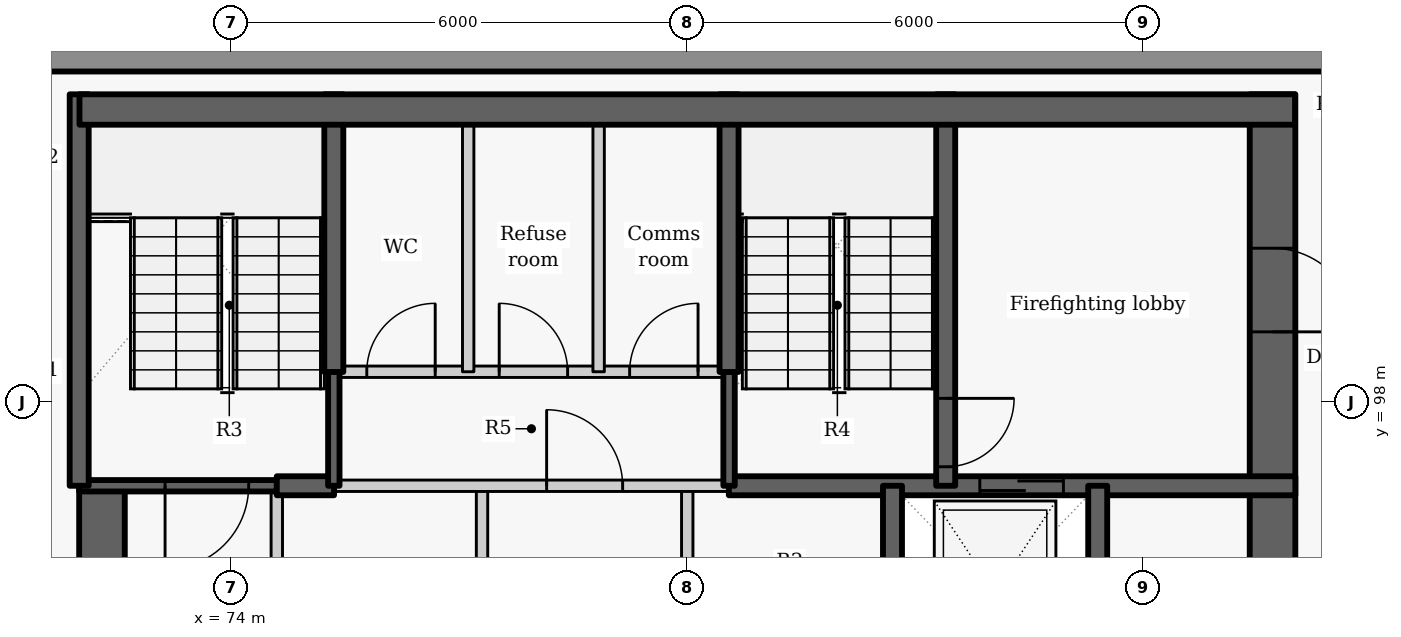
"""IFC4 building model, lengths in metres.
Left out: names, types, materials, properties, quantities, classifications, styles, units other than length and angle.
Written with IfcOpenShell. Run it as: python <this file> out.ifc"""

import sys

from ifc_helpers import new_model, si_unit, direction, frame, frame_2d, origin, place, context, subcontext, project, spatial, rectangle, extrude, element, fill, save


model = new_model("IFC4")
c1 = context("Model", 3, precision=1e-05, world=origin(), true_north=direction((0.0, 1.0)))
c2 = subcontext(c1, "Body", "Model", "MODEL_VIEW")
j1 = project(units=[si_unit("LENGTHUNIT", "METRE"), si_unit("PLANEANGLEUNIT", "RADIAN")], contexts=[c1])
p1 = place(None, origin())
s1 = spatial("IfcSite", under=j1, at=p1, CompositionType="ELEMENT")
p2 = place(p1, origin())
s2 = spatial("IfcBuilding", under=s1, at=p2, CompositionType="ELEMENT")
p3 = place(p2, frame((0.0, 0.0, 279.6)))
s3 = spatial("IfcBuildingStorey", under=s2, at=p3, CompositionType="ELEMENT", Elevation=279.6)
p4 = place(p3, frame((89.549, 102.5, 0.0), z_axis=(0.0, 0.0, 1.0), x_axis=(-1.0, 0.0, 0.0)))
e1 = element("IfcWall", 1, at=p4, inside=s3, PredefinedType="SOLIDWALL", context=c2, shape_type="SweptSolid", body=[
    extrude(rectangle(XDim=19.134, YDim=0.3, at=frame_2d((9.567, 0.0))), origin(), (0.0, 0.0, 1.0), 2.725),
])
p5 = place(p3, frame((74.6, 94.1, 0.0), z_axis=(0.0, 0.0, 1.0), x_axis=(0.0, 1.0, 0.0)))
e2 = element("IfcWall", 2, at=p5, inside=s3, PredefinedType="PARTITIONING", context=c2, shape_type="SweptSolid", body=[
    extrude(rectangle(XDim=2.8, YDim=0.15, at=frame_2d((1.4, 0.0))), origin(), (0.0, 0.0, 1.0), 3.325),
])
p6 = place(p3, frame((72.3, 87.8, -0.275), z_axis=(0.0, 0.0, 1.0), x_axis=(0.0, 1.0, 0.0)))
e3 = element("IfcWall", 3, at=p6, inside=s3, PredefinedType="SHEAR", context=c2, shape_type="SweptSolid", body=[
    extrude(rectangle(XDim=9.1, YDim=0.6, at=frame_2d((4.55, 0.0))), origin(), (0.0, 0.0, 1.0), 3.6),
])
p7 = place(p6, frame((3.85, 0.0, 0.275)))
e4 = element("IfcOpeningElement", 4, at=p7, cuts=e3, PredefinedType="OPENING", context=c2, shape_type="SweptSolid", body=[
    extrude(rectangle(XDim=1.5, YDim=2.1, at=frame_2d((0.75, 1.05))), frame((0.0, 0.31, 0.0), z_axis=(0.0, -1.0, 0.0), x_axis=(1.0, 0.0, 0.0)), (0.0, 0.0, 1.0), 0.62),
])
p8 = place(p3, frame((80.0, 94.1, 0.0), z_axis=(0.0, 0.0, 1.0), x_axis=(0.0, 1.0, 0.0)))
e5 = element("IfcWall", 5, at=p8, inside=s3, PredefinedType="PARTITIONING", context=c2, shape_type="SweptSolid", body=[
    extrude(rectangle(XDim=2.8, YDim=0.15, at=frame_2d((1.4, 0.0))), origin(), (0.0, 0.0, 1.0), 3.325),
])
p9 = place(p3, frame((87.7, 102.05, -0.275), z_axis=(0.0, 0.0, 1.0), x_axis=(0.0, -1.0, 0.0)))
e6 = element("IfcWall", 6, at=p9, inside=s3, PredefinedType="SHEAR", context=c2, shape_type="SweptSolid", body=[
    extrude(rectangle(XDim=11.35, YDim=0.6, at=frame_2d((5.675, 0.0))), origin(), (0.0, 0.0, 1.0), 3.6),
])
p10 = place(p9, frame((8.9, 0.0, 0.275)))
e7 = element("IfcOpeningElement", 7, at=p10, cuts=e6, PredefinedType="OPENING", context=c2, shape_type="SweptSolid", body=[
    extrude(rectangle(XDim=1.5, YDim=2.1, at=frame_2d((0.75, 1.05))), frame((0.0, 0.31, 0.0), z_axis=(0.0, -1.0, 0.0), x_axis=(1.0, 0.0, 0.0)), (0.0, 0.0, 1.0), 0.62),
])
p11 = place(p9, frame((2.025, 0.0, 0.275)))
e8 = element("IfcOpeningElement", 8, at=p11, cuts=e6, PredefinedType="OPENING", context=c2, shape_type="SweptSolid", body=[
    extrude(rectangle(XDim=1.1, YDim=2.1, at=frame_2d((0.55, 1.05))), frame((0.0, 0.31, 0.0), z_axis=(0.0, -1.0, 0.0), x_axis=(1.0, 0.0, 0.0)), (0.0, 0.0, 1.0), 0.62),
])
p12 = place(p3, frame((74.6, 96.9, -0.275), z_axis=(0.0, 0.0, 1.0), x_axis=(-1.0, 0.0, 0.0)))
e9 = element("IfcWall", 9, at=p12, inside=s3, PredefinedType="SHEAR", context=c2, shape_type="SweptSolid", body=[
    extrude(rectangle(XDim=2.6, YDim=0.15, at=frame_2d((1.3, 0.0))), origin(), (0.0, 0.0, 1.0), 3.6),
])
p13 = place(p12, frame((0.37, 0.0, 0.275)))
e10 = element("IfcOpeningElement", 10, at=p13, cuts=e9, PredefinedType="OPENING", context=c2, shape_type="SweptSolid", body=[
    extrude(rectangle(XDim=1.1, YDim=2.1, at=frame_2d((0.55, 1.05))), frame((0.0, 0.085, 0.0), z_axis=(0.0, -1.0, 0.0), x_axis=(1.0, 0.0, 0.0)), (0.0, 0.0, 1.0), 0.17),
])
p14 = place(p3, frame((77.3, 94.1, 0.0), z_axis=(0.0, 0.0, 1.0), x_axis=(0.0, 1.0, 0.0)))
e11 = element("IfcWall", 11, at=p14, inside=s3, PredefinedType="PARTITIONING", context=c2, shape_type="SweptSolid", body=[
    extrude(rectangle(XDim=2.8, YDim=0.15, at=frame_2d((1.4, 0.0))), origin(), (0.0, 0.0, 1.0), 3.325),
])
p15 = place(p3, frame((74.6, 96.9, -0.275), z_axis=(0.0, 0.0, 1.0), x_axis=(1.0, 0.0, 0.0)))
e12 = element("IfcWall", 12, at=p15, inside=s3, PredefinedType="SHEAR", context=c2, shape_type="SweptSolid", body=[
    extrude(rectangle(XDim=0.753, YDim=0.25, at=frame_2d((0.376, 0.0))), origin(), (0.0, 0.0, 1.0), 3.6),
])
p16 = place(p3, frame((80.547, 96.9, -0.275), z_axis=(0.0, 0.0, 1.0), x_axis=(1.0, 0.0, 0.0)))
e13 = element("IfcWall", 13, at=p16, inside=s3, PredefinedType="SHEAR", context=c2, shape_type="SweptSolid", body=[
    extrude(rectangle(XDim=7.453, YDim=0.25, at=frame_2d((3.727, 0.0))), origin(), (0.0, 0.0, 1.0), 3.6),
])
p17 = place(p16, frame((3.302, 0.0, 0.275)))
e14 = element("IfcOpeningElement", 14, at=p17, cuts=e13, PredefinedType="OPENING", context=c2, shape_type="SweptSolid", body=[
    extrude(rectangle(XDim=1.1, YDim=2.1, at=frame_2d((0.55, 1.05))), frame((0.0, 0.135, 0.0), z_axis=(0.0, -1.0, 0.0), x_axis=(1.0, 0.0, 0.0)), (0.0, 0.0, 1.0), 0.27),
])
p18 = place(p3, frame((75.347, 96.9, 0.0), z_axis=(0.0, 0.0, 1.0), x_axis=(1.0, 0.0, 0.0)))
e15 = element("IfcWall", 15, at=p18, inside=s3, PredefinedType="PARTITIONING", context=c2, shape_type="SweptSolid", body=[
    extrude(rectangle(XDim=5.206, YDim=0.15, at=frame_2d((2.603, 0.0))), origin(), (0.0, 0.0, 1.0), 3.325),
])
p19 = place(p18, frame((2.803, 0.0, 0.0)))
e16 = element("IfcOpeningElement", 16, at=p19, cuts=e15, PredefinedType="OPENING", context=c2, shape_type="SweptSolid", body=[
    extrude(rectangle(XDim=1.0, YDim=2.1, at=frame_2d((0.5, 1.05))), frame((0.0, 0.085, 0.0), z_axis=(0.0, -1.0, 0.0), x_axis=(1.0, 0.0, 0.0)), (0.0, 0.0, 1.0), 0.17),
])
for number, where, z_axis, x_axis in (
    (17, (82.7, 94.1, -0.275), (0.0, 0.0, 1.0), (0.0, 1.0, 0.0)),
    (18, (85.4, 94.1, -0.275), (0.0, 0.0, 1.0), (0.0, 1.0, 0.0)),
):
    element("IfcWall", number, at=place(p3, frame(where, z_axis=z_axis, x_axis=x_axis)), inside=s3, PredefinedType="SHEAR", context=c2, shape_type="SweptSolid", body=[
        extrude(rectangle(XDim=2.8, YDim=0.25, at=frame_2d((1.4, 0.0))), origin(), (0.0, 0.0, 1.0), 3.6),
    ])
p20 = place(p3, frame((75.35, 96.9, -0.275), z_axis=(0.0, 0.0, 1.0), x_axis=(0.0, 1.0, 0.0)))
e19 = element("IfcWall", 19, at=p20, inside=s3, PredefinedType="SHEAR", context=c2, shape_type="SweptSolid", body=[
    extrude(rectangle(XDim=1.503, YDim=0.15, at=frame_2d((0.751, 0.0))), origin(), (0.0, 0.0, 1.0), 3.6),
])
p21 = place(p3, frame((75.35, 98.397, -0.275), z_axis=(0.0, 0.0, 1.0), x_axis=(0.0, 1.0, 0.0)))
e20 = element("IfcWall", 20, at=p21, inside=s3, PredefinedType="SHEAR", context=c2, shape_type="SweptSolid", body=[
    extrude(rectangle(XDim=3.653, YDim=0.25, at=frame_2d((1.827, 0.0))), origin(), (0.0, 0.0, 1.0), 3.6),
])
p22 = place(p3, frame((72.0, 96.9, -0.275), z_axis=(0.0, 0.0, 1.0), x_axis=(0.0, 1.0, 0.0)))
e21 = element("IfcWall", 21, at=p22, inside=s3, PredefinedType="SHEAR", context=c2, shape_type="SweptSolid", body=[
    extrude(rectangle(XDim=5.15, YDim=0.25, at=frame_2d((2.575, 0.0))), origin(), (0.0, 0.0, 1.0), 3.6),
])
p23 = place(p3, frame((83.4, 102.05, -0.275), z_axis=(0.0, 0.0, 1.0), x_axis=(0.0, -1.0, 0.0)))
e22 = element("IfcWall", 22, at=p23, inside=s3, PredefinedType="SHEAR", context=c2, shape_type="SweptSolid", body=[
    extrude(rectangle(XDim=5.15, YDim=0.25, at=frame_2d((2.575, 0.0))), origin(), (0.0, 0.0, 1.0), 3.6),
])
p24 = place(p23, frame((4.0, 0.0, 0.275)))
e23 = element("IfcOpeningElement", 23, at=p24, cuts=e22, PredefinedType="OPENING", context=c2, shape_type="SweptSolid", body=[
    extrude(rectangle(XDim=0.9, YDim=2.1, at=frame_2d((0.45, 1.05))), frame((0.0, 0.135, 0.0), z_axis=(0.0, -1.0, 0.0), x_axis=(1.0, 0.0, 0.0)), (0.0, 0.0, 1.0), 0.27),
])
p25 = place(p3, frame((80.55, 96.9, -0.275), z_axis=(0.0, 0.0, 1.0), x_axis=(0.0, 1.0, 0.0)))
e24 = element("IfcWall", 24, at=p25, inside=s3, PredefinedType="SHEAR", context=c2, shape_type="SweptSolid", body=[
    extrude(rectangle(XDim=1.503, YDim=0.15, at=frame_2d((0.751, 0.0))), origin(), (0.0, 0.0, 1.0), 3.6),
])
p26 = place(p3, frame((80.55, 98.397, -0.275), z_axis=(0.0, 0.0, 1.0), x_axis=(0.0, 1.0, 0.0)))
e25 = element("IfcWall", 25, at=p26, inside=s3, PredefinedType="SHEAR", context=c2, shape_type="SweptSolid", body=[
    extrude(rectangle(XDim=3.653, YDim=0.25, at=frame_2d((1.827, 0.0))), origin(), (0.0, 0.0, 1.0), 3.6),
])
p27 = place(p3, frame((75.35, 98.4, 0.0), z_axis=(0.0, 0.0, 1.0), x_axis=(1.0, 0.0, 0.0)))
e26 = element("IfcWall", 26, at=p27, inside=s3, PredefinedType="PARTITIONING", context=c2, shape_type="SweptSolid", body=[
    extrude(rectangle(XDim=5.2, YDim=0.15, at=frame_2d((2.6, 0.0))), origin(), (0.0, 0.0, 1.0), 3.325),
])
p28 = place(p27, frame((0.434, 0.0, 0.0)))
e27 = element("IfcOpeningElement", 27, at=p28, cuts=e26, PredefinedType="OPENING", context=c2, shape_type="SweptSolid", body=[
    extrude(rectangle(XDim=0.9, YDim=2.1, at=frame_2d((0.45, 1.05))), frame((0.0, 0.085, 0.0), z_axis=(0.0, -1.0, 0.0), x_axis=(1.0, 0.0, 0.0)), (0.0, 0.0, 1.0), 0.17),
])
p29 = place(p27, frame((2.176, 0.0, 0.0)))
e28 = element("IfcOpeningElement", 28, at=p29, cuts=e26, PredefinedType="OPENING", context=c2, shape_type="SweptSolid", body=[
    extrude(rectangle(XDim=0.9, YDim=2.1, at=frame_2d((0.45, 1.05))), frame((0.0, 0.085, 0.0), z_axis=(0.0, -1.0, 0.0), x_axis=(1.0, 0.0, 0.0)), (0.0, 0.0, 1.0), 0.17),
])
p30 = place(p27, frame((3.892, 0.0, 0.0)))
e29 = element("IfcOpeningElement", 29, at=p30, cuts=e26, PredefinedType="OPENING", context=c2, shape_type="SweptSolid", body=[
    extrude(rectangle(XDim=0.9, YDim=2.1, at=frame_2d((0.45, 1.05))), frame((0.0, 0.085, 0.0), z_axis=(0.0, -1.0, 0.0), x_axis=(1.0, 0.0, 0.0)), (0.0, 0.0, 1.0), 0.17),
])
for number, where, z_axis, x_axis in (
    (30, (77.118, 98.4, 0.0), (0.0, 0.0, 1.0), (0.0, 1.0, 0.0)),
    (31, (78.834, 98.4, 0.0), (0.0, 0.0, 1.0), (0.0, 1.0, 0.0)),
):
    element("IfcWall", number, at=place(p3, frame(where, z_axis=z_axis, x_axis=x_axis)), inside=s3, PredefinedType="PARTITIONING", context=c2, shape_type="SweptSolid", body=[
        extrude(rectangle(XDim=3.65, YDim=0.15, at=frame_2d((1.825, 0.0))), origin(), (0.0, 0.0, 1.0), 3.325),
    ])
p31 = place(p3, frame((72.004, 101.85, -0.275), z_axis=(0.0, 0.0, 1.0), x_axis=(1.0, 0.0, 0.0)))
e32 = element("IfcWall", 32, at=p31, inside=s3, PredefinedType="SHEAR", context=c2, shape_type="SweptSolid", body=[
    extrude(rectangle(XDim=15.992, YDim=0.4, at=frame_2d((7.996, 0.0))), origin(), (0.0, 0.0, 1.0), 3.6),
])
p32 = place(p17, origin())
e33 = element("IfcDoor", 33, at=p32, inside=s3, OperationType="SLIDING_TO_LEFT", PredefinedType="DOOR", context=c2, shape_type="SweptSolid", body=[
    extrude(rectangle(XDim=1.1, YDim=2.1, at=frame_2d((0.55, 1.05))), frame((0.0, 0.025, 0.0), z_axis=(0.0, -1.0, 0.0), x_axis=(1.0, 0.0, 0.0)), (0.0, 0.0, 1.0), 0.05),
])
fill(e14, e33)
p33 = place(p19, origin())
e34 = element("IfcDoor", 34, at=p33, inside=s3, OperationType="SINGLE_SWING_LEFT", PredefinedType="DOOR", context=c2, shape_type="SweptSolid", body=[
    extrude(rectangle(XDim=1.0, YDim=2.1, at=frame_2d((0.5, 1.05))), frame((0.0, 0.025, 0.0), z_axis=(0.0, -1.0, 0.0), x_axis=(1.0, 0.0, 0.0)), (0.0, 0.0, 1.0), 0.05),
])
fill(e16, e34)
p34 = place(p28, origin())
e35 = element("IfcDoor", 35, at=p34, inside=s3, OperationType="SINGLE_SWING_RIGHT", PredefinedType="DOOR", context=c2, shape_type="SweptSolid", body=[
    extrude(rectangle(XDim=0.9, YDim=2.1, at=frame_2d((0.45, 1.05))), frame((0.0, 0.025, 0.0), z_axis=(0.0, -1.0, 0.0), x_axis=(1.0, 0.0, 0.0)), (0.0, 0.0, 1.0), 0.05),
])
fill(e27, e35)
p35 = place(p29, origin())
e36 = element("IfcDoor", 36, at=p35, inside=s3, OperationType="SINGLE_SWING_LEFT", PredefinedType="DOOR", context=c2, shape_type="SweptSolid", body=[
    extrude(rectangle(XDim=0.9, YDim=2.1, at=frame_2d((0.45, 1.05))), frame((0.0, 0.025, 0.0), z_axis=(0.0, -1.0, 0.0), x_axis=(1.0, 0.0, 0.0)), (0.0, 0.0, 1.0), 0.05),
])
fill(e28, e36)
p36 = place(p30, origin())
e37 = element("IfcDoor", 37, at=p36, inside=s3, OperationType="SINGLE_SWING_RIGHT", PredefinedType="DOOR", context=c2, shape_type="SweptSolid", body=[
    extrude(rectangle(XDim=0.9, YDim=2.1, at=frame_2d((0.45, 1.05))), frame((0.0, 0.025, 0.0), z_axis=(0.0, -1.0, 0.0), x_axis=(1.0, 0.0, 0.0)), (0.0, 0.0, 1.0), 0.05),
])
fill(e29, e37)
p37 = place(p13, origin())
e38 = element("IfcDoor", 38, at=p37, inside=s3, OperationType="SINGLE_SWING_RIGHT", PredefinedType="DOOR", context=c2, shape_type="SweptSolid", body=[
    extrude(rectangle(XDim=1.1, YDim=2.1, at=frame_2d((0.55, 1.05))), frame((0.0, 0.025, 0.0), z_axis=(0.0, -1.0, 0.0), x_axis=(1.0, 0.0, 0.0)), (0.0, 0.0, 1.0), 0.05),
])
fill(e10, e38)
p38 = place(p24, origin())
e39 = element("IfcDoor", 39, at=p38, inside=s3, OperationType="SINGLE_SWING_LEFT", PredefinedType="DOOR", context=c2, shape_type="SweptSolid", body=[
    extrude(rectangle(XDim=0.9, YDim=2.1, at=frame_2d((0.45, 1.05))), frame((0.0, 0.025, 0.0), z_axis=(0.0, -1.0, 0.0), x_axis=(1.0, 0.0, 0.0)), (0.0, 0.0, 1.0), 0.05),
])
fill(e23, e39)
p39 = place(p11, origin())
e40 = element("IfcDoor", 40, at=p39, inside=s3, OperationType="SINGLE_SWING_RIGHT", PredefinedType="DOOR", context=c2, shape_type="SweptSolid", body=[
    extrude(rectangle(XDim=1.1, YDim=2.1, at=frame_2d((0.55, 1.05))), frame((0.0, 0.025, 0.0), z_axis=(0.0, -1.0, 0.0), x_axis=(1.0, 0.0, 0.0)), (0.0, 0.0, 1.0), 0.05),
])
fill(e8, e40)
save(model, sys.argv[1])
